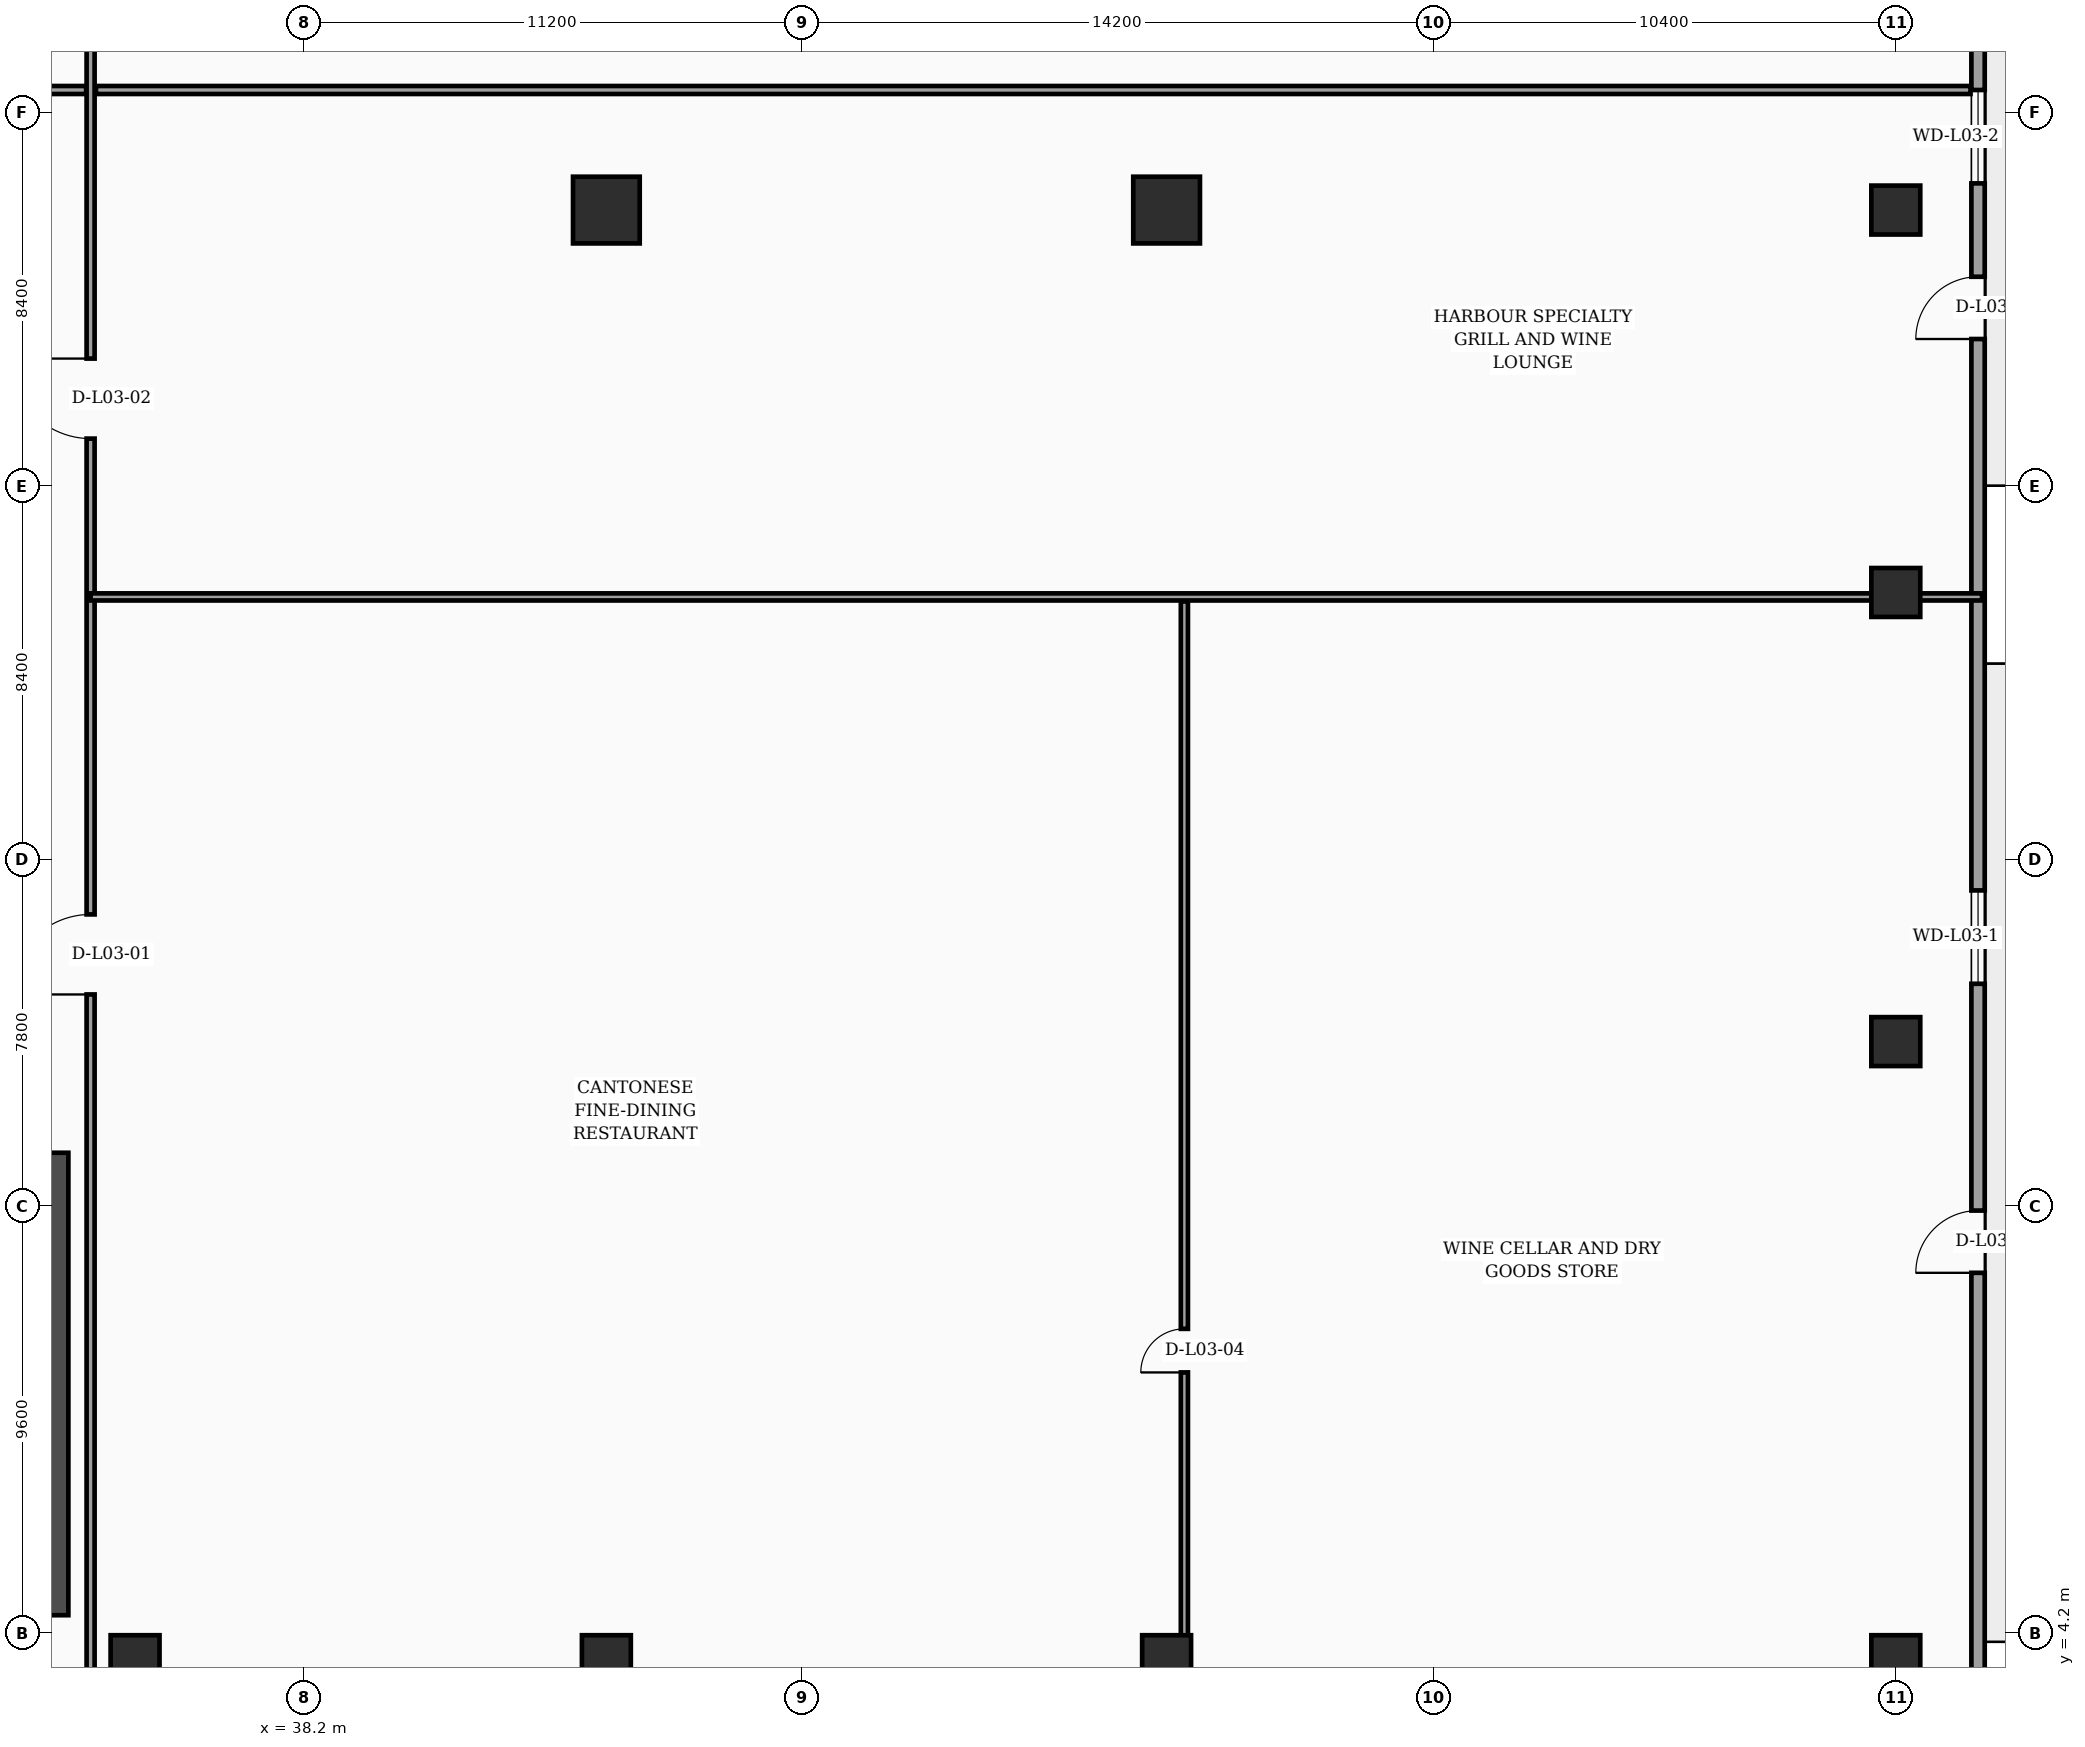
"""IFC4 building model, lengths in metres.
Left out: names, types, materials, properties, quantities, classifications, styles, units other than length and angle.
Written with IfcOpenShell. Run it as: python <this file> out.ifc"""

import sys

from ifc_helpers import new_model, si_unit, direction, frame, frame_2d, origin, origin_2d, place, context, subcontext, project, spatial, rectangle, hollow_rectangle, extrude, element, fill, save


model = new_model("IFC4")
c1 = context("Model", 3, precision=1e-05, world=origin(), true_north=direction((0.0, 1.0)))
c2 = subcontext(c1, "Body", "Model", "MODEL_VIEW")
j1 = project(units=[si_unit("LENGTHUNIT", "METRE"), si_unit("PLANEANGLEUNIT", "RADIAN")], contexts=[c1])
p1 = place(None, origin())
s1 = spatial("IfcSite", under=j1, at=p1, CompositionType="ELEMENT")
p2 = place(p1, origin())
s2 = spatial("IfcBuilding", under=s1, at=p2, CompositionType="ELEMENT")
p3 = place(p2, frame((0.0, 0.0, 17.0)))
s3 = spatial("IfcBuildingStorey", under=s2, at=p3, CompositionType="ELEMENT", Elevation=17.0)
p4 = place(p3, frame((32.4, 4.6, 0.0), z_axis=(0.0, 0.0, 1.0), x_axis=(0.0, 1.0, 0.0)))
e1 = element("IfcWall", 1, at=p4, inside=s3, PredefinedType="SHEAR", context=c2, shape_type="SweptSolid", body=[
    extrude(rectangle(XDim=10.4, YDim=1.0, at=frame_2d((5.2, 0.0))), origin(), (0.0, 0.0, 1.0), 4.55),
])
for number, where, z_axis, x_axis in (
    (2, (34.4, 3.6, 0.0), (0.0, 0.0, 1.0), (1.0, 0.0, 0.0)),
    (3, (45.0, 3.6, 0.0), (0.0, 0.0, 1.0), (1.0, 0.0, 0.0)),
    (4, (57.6, 3.6, 0.0), (0.0, 0.0, 1.0), (1.0, 0.0, 0.0)),
    (5, (74.0, 3.6, 0.0), (0.0, 0.0, 1.0), (1.0, 0.0, 0.0)),
    (6, (74.0, 17.5, 0.0), (0.0, 0.0, 1.0), (1.0, 0.0, 0.0)),
    (7, (74.0, 27.6, 0.0), (0.0, 0.0, 1.0), (1.0, 0.0, 0.0)),
    (8, (74.0, 36.2, 0.0), (0.0, 0.0, 1.0), (1.0, 0.0, 0.0)),
):
    element("IfcColumn", number, at=place(p3, frame(where, z_axis=z_axis, x_axis=x_axis)), inside=s3, PredefinedType="COLUMN", context=c2, shape_type="SweptSolid", body=[
        extrude(hollow_rectangle(XDim=1.1, YDim=1.1, WallThickness=0.045, at=origin_2d()), origin(), (0.0, 0.0, 1.0), 4.55),
    ])
for number, where, z_axis, x_axis in (
    (9, (45.0, 36.2, 0.0), (0.0, 0.0, 1.0), (1.0, 0.0, 0.0)),
    (10, (57.6, 36.2, 0.0), (0.0, 0.0, 1.0), (1.0, 0.0, 0.0)),
):
    element("IfcColumn", number, at=place(p3, frame(where, z_axis=z_axis, x_axis=x_axis)), inside=s3, PredefinedType="COLUMN", context=c2, shape_type="SweptSolid", body=[
        extrude(rectangle(XDim=1.5, YDim=1.5, at=origin_2d()), origin(), (0.0, 0.0, 1.0), 4.55),
    ])
p5 = place(p3, frame((75.85, 2.3, 0.0), z_axis=(0.0, 0.0, 1.0), x_axis=(0.0, 1.0, 0.0)))
e11 = element("IfcWall", 11, at=p5, inside=s3, PredefinedType="SOLIDWALL", context=c2, shape_type="SweptSolid", body=[
    extrude(rectangle(XDim=50.9, YDim=0.3, at=frame_2d((25.45, 0.0))), origin(), (0.0, 0.0, 1.0), 4.55),
])
p6 = place(p5, frame((10.0, 0.0, 0.0)))
e12 = element("IfcOpeningElement", 12, at=p6, cuts=e11, PredefinedType="OPENING", context=c2, shape_type="SweptSolid", body=[
    extrude(rectangle(XDim=1.4, YDim=2.25, at=frame_2d((0.7, 1.125))), frame((0.0, 0.16, 0.0), z_axis=(0.0, -1.0, 0.0), x_axis=(1.0, 0.0, 0.0)), (0.0, 0.0, 1.0), 0.32),
])
p7 = place(p5, frame((31.0, 0.0, 0.0)))
e13 = element("IfcOpeningElement", 13, at=p7, cuts=e11, PredefinedType="OPENING", context=c2, shape_type="SweptSolid", body=[
    extrude(rectangle(XDim=1.4, YDim=2.25, at=frame_2d((0.7, 1.125))), frame((0.0, 0.16, 0.0), z_axis=(0.0, -1.0, 0.0), x_axis=(1.0, 0.0, 0.0)), (0.0, 0.0, 1.0), 0.32),
])
p8 = place(p5, frame((16.5, 0.0, 0.85)))
e14 = element("IfcOpeningElement", 14, at=p8, cuts=e11, PredefinedType="OPENING", context=c2, shape_type="SweptSolid", body=[
    extrude(rectangle(XDim=2.1, YDim=2.1, at=frame_2d((1.05, 1.05))), frame((0.0, 0.16, 0.0), z_axis=(0.0, -1.0, 0.0), x_axis=(1.0, 0.0, 0.0)), (0.0, 0.0, 1.0), 0.32),
])
p9 = place(p5, frame((34.5, 0.0, 0.85)))
e15 = element("IfcOpeningElement", 15, at=p9, cuts=e11, PredefinedType="OPENING", context=c2, shape_type="SweptSolid", body=[
    extrude(rectangle(XDim=2.1, YDim=2.1, at=frame_2d((1.05, 1.05))), frame((0.0, 0.16, 0.0), z_axis=(0.0, -1.0, 0.0), x_axis=(1.0, 0.0, 0.0)), (0.0, 0.0, 1.0), 0.32),
])
p10 = place(p3, frame((15.2, 38.9, 0.0), z_axis=(0.0, 0.0, 1.0), x_axis=(1.0, 0.0, 0.0)))
e16 = element("IfcWall", 16, at=p10, inside=s3, PredefinedType="PARTITIONING", context=c2, shape_type="SweptSolid", body=[
    extrude(rectangle(XDim=18.1, YDim=0.18, at=frame_2d((9.05, 0.0))), origin(), (0.0, 0.0, 1.0), 3.75),
])
p11 = place(p10, frame((2.2, 0.0, 0.0)))
e17 = element("IfcOpeningElement", 17, at=p11, cuts=e16, PredefinedType="OPENING", context=c2, shape_type="SweptSolid", body=[
    extrude(rectangle(XDim=1.02, YDim=2.2, at=frame_2d((0.51, 1.1))), frame((0.0, 0.1, 0.0), z_axis=(0.0, -1.0, 0.0), x_axis=(1.0, 0.0, 0.0)), (0.0, 0.0, 1.0), 0.2),
])
p12 = place(p10, frame((8.2, 0.0, 0.0)))
e18 = element("IfcOpeningElement", 18, at=p12, cuts=e16, PredefinedType="OPENING", context=c2, shape_type="SweptSolid", body=[
    extrude(rectangle(XDim=1.02, YDim=2.2, at=frame_2d((0.51, 1.1))), frame((0.0, 0.1, 0.0), z_axis=(0.0, -1.0, 0.0), x_axis=(1.0, 0.0, 0.0)), (0.0, 0.0, 1.0), 0.2),
])
p13 = place(p10, frame((14.2, 0.0, 0.0)))
e19 = element("IfcOpeningElement", 19, at=p13, cuts=e16, PredefinedType="OPENING", context=c2, shape_type="SweptSolid", body=[
    extrude(rectangle(XDim=1.02, YDim=2.2, at=frame_2d((0.51, 1.1))), frame((0.0, 0.1, 0.0), z_axis=(0.0, -1.0, 0.0), x_axis=(1.0, 0.0, 0.0)), (0.0, 0.0, 1.0), 0.2),
])
p14 = place(p3, frame((58.0, 0.06, 0.0), z_axis=(0.0, 0.0, 1.0), x_axis=(0.0, 1.0, 0.0)))
e20 = element("IfcWall", 20, at=p14, inside=s3, PredefinedType="PARTITIONING", context=c2, shape_type="SweptSolid", body=[
    extrude(rectangle(XDim=27.34, YDim=0.16, at=frame_2d((13.67, 0.0))), origin(), (0.0, 0.0, 1.0), 3.05),
])
p15 = place(p14, frame((10.0, 0.0, 0.0)))
e21 = element("IfcOpeningElement", 21, at=p15, cuts=e20, PredefinedType="OPENING", context=c2, shape_type="SweptSolid", body=[
    extrude(rectangle(XDim=0.98, YDim=2.15, at=frame_2d((0.49, 1.075))), frame((0.0, 0.09, 0.0), z_axis=(0.0, -1.0, 0.0), x_axis=(1.0, 0.0, 0.0)), (0.0, 0.0, 1.0), 0.18),
])
p16 = place(p3, frame((33.4, 0.06, 0.0), z_axis=(0.0, 0.0, 1.0), x_axis=(0.0, 1.0, 0.0)))
e22 = element("IfcWall", 22, at=p16, inside=s3, PredefinedType="PARTITIONING", context=c2, shape_type="SweptSolid", body=[
    extrude(rectangle(XDim=55.38, YDim=0.18, at=frame_2d((27.69, 0.0))), origin(), (0.0, 0.0, 1.0), 3.75),
])
p17 = place(p16, frame((18.5, 0.0, 0.0)))
e23 = element("IfcOpeningElement", 23, at=p17, cuts=e22, PredefinedType="OPENING", context=c2, shape_type="SweptSolid", body=[
    extrude(rectangle(XDim=1.8, YDim=2.4, at=frame_2d((0.9, 1.2))), frame((0.0, 0.1, 0.0), z_axis=(0.0, -1.0, 0.0), x_axis=(1.0, 0.0, 0.0)), (0.0, 0.0, 1.0), 0.2),
])
p18 = place(p16, frame((31.0, 0.0, 0.0)))
e24 = element("IfcOpeningElement", 24, at=p18, cuts=e22, PredefinedType="OPENING", context=c2, shape_type="SweptSolid", body=[
    extrude(rectangle(XDim=1.8, YDim=2.4, at=frame_2d((0.9, 1.2))), frame((0.0, 0.1, 0.0), z_axis=(0.0, -1.0, 0.0), x_axis=(1.0, 0.0, 0.0)), (0.0, 0.0, 1.0), 0.2),
])
p19 = place(p3, frame((33.4, 27.5, 0.0), z_axis=(0.0, 0.0, 1.0), x_axis=(1.0, 0.0, 0.0)))
e25 = element("IfcWall", 25, at=p19, inside=s3, PredefinedType="PARTITIONING", context=c2, shape_type="SweptSolid", body=[
    extrude(rectangle(XDim=42.54, YDim=0.16, at=frame_2d((21.27, 0.0))), origin(), (0.0, 0.0, 1.0), 3.05),
])
p20 = place(p3, frame((33.52, 38.9, 0.0), z_axis=(0.0, 0.0, 1.0), x_axis=(1.0, 0.0, 0.0)))
e26 = element("IfcWall", 26, at=p20, inside=s3, PredefinedType="PARTITIONING", context=c2, shape_type="SweptSolid", body=[
    extrude(rectangle(XDim=42.16, YDim=0.18, at=frame_2d((21.08, 0.0))), origin(), (0.0, 0.0, 1.0), 3.75),
])
p21 = place(p6, origin())
e27 = element("IfcDoor", 27, at=p21, inside=s3, OperationType="SINGLE_SWING_LEFT", PredefinedType="DOOR", context=c2, shape_type="SweptSolid", body=[
    extrude(rectangle(XDim=1.4, YDim=2.25, at=frame_2d((0.7, 1.125))), frame((0.0, 0.025, 0.0), z_axis=(0.0, -1.0, 0.0), x_axis=(1.0, 0.0, 0.0)), (0.0, 0.0, 1.0), 0.05),
])
fill(e12, e27)
p22 = place(p7, origin())
e28 = element("IfcDoor", 28, at=p22, inside=s3, OperationType="SINGLE_SWING_LEFT", PredefinedType="DOOR", context=c2, shape_type="SweptSolid", body=[
    extrude(rectangle(XDim=1.4, YDim=2.25, at=frame_2d((0.7, 1.125))), frame((0.0, 0.025, 0.0), z_axis=(0.0, -1.0, 0.0), x_axis=(1.0, 0.0, 0.0)), (0.0, 0.0, 1.0), 0.05),
])
fill(e13, e28)
p23 = place(p8, origin())
e29 = element("IfcWindow", 29, at=p23, inside=s3, PartitioningType="SINGLE_PANEL", PredefinedType="WINDOW", context=c2, shape_type="SweptSolid", body=[
    extrude(rectangle(XDim=2.1, YDim=2.1, at=frame_2d((1.05, 1.05))), frame((0.0, 0.03, 0.0), z_axis=(0.0, -1.0, 0.0), x_axis=(1.0, 0.0, 0.0)), (0.0, 0.0, 1.0), 0.06),
])
fill(e14, e29)
p24 = place(p9, origin())
e30 = element("IfcWindow", 30, at=p24, inside=s3, PartitioningType="SINGLE_PANEL", PredefinedType="WINDOW", context=c2, shape_type="SweptSolid", body=[
    extrude(rectangle(XDim=2.1, YDim=2.1, at=frame_2d((1.05, 1.05))), frame((0.0, 0.03, 0.0), z_axis=(0.0, -1.0, 0.0), x_axis=(1.0, 0.0, 0.0)), (0.0, 0.0, 1.0), 0.06),
])
fill(e15, e30)
p25 = place(p15, origin())
e31 = element("IfcDoor", 31, at=p25, inside=s3, OperationType="SINGLE_SWING_LEFT", PredefinedType="DOOR", context=c2, shape_type="SweptSolid", body=[
    extrude(rectangle(XDim=0.98, YDim=2.15, at=frame_2d((0.49, 1.075))), frame((0.0, 0.025, 0.0), z_axis=(0.0, -1.0, 0.0), x_axis=(1.0, 0.0, 0.0)), (0.0, 0.0, 1.0), 0.05),
])
fill(e21, e31)
p26 = place(p17, origin())
e32 = element("IfcDoor", 32, at=p26, inside=s3, OperationType="SINGLE_SWING_LEFT", PredefinedType="DOOR", context=c2, shape_type="SweptSolid", body=[
    extrude(rectangle(XDim=1.8, YDim=2.4, at=frame_2d((0.9, 1.2))), frame((0.0, 0.025, 0.0), z_axis=(0.0, -1.0, 0.0), x_axis=(1.0, 0.0, 0.0)), (0.0, 0.0, 1.0), 0.05),
])
fill(e23, e32)
p27 = place(p18, origin())
e33 = element("IfcDoor", 33, at=p27, inside=s3, OperationType="SINGLE_SWING_RIGHT", PredefinedType="DOOR", context=c2, shape_type="SweptSolid", body=[
    extrude(rectangle(XDim=1.8, YDim=2.4, at=frame_2d((0.9, 1.2))), frame((0.0, 0.025, 0.0), z_axis=(0.0, -1.0, 0.0), x_axis=(1.0, 0.0, 0.0)), (0.0, 0.0, 1.0), 0.05),
])
fill(e24, e33)
save(model, sys.argv[1])
